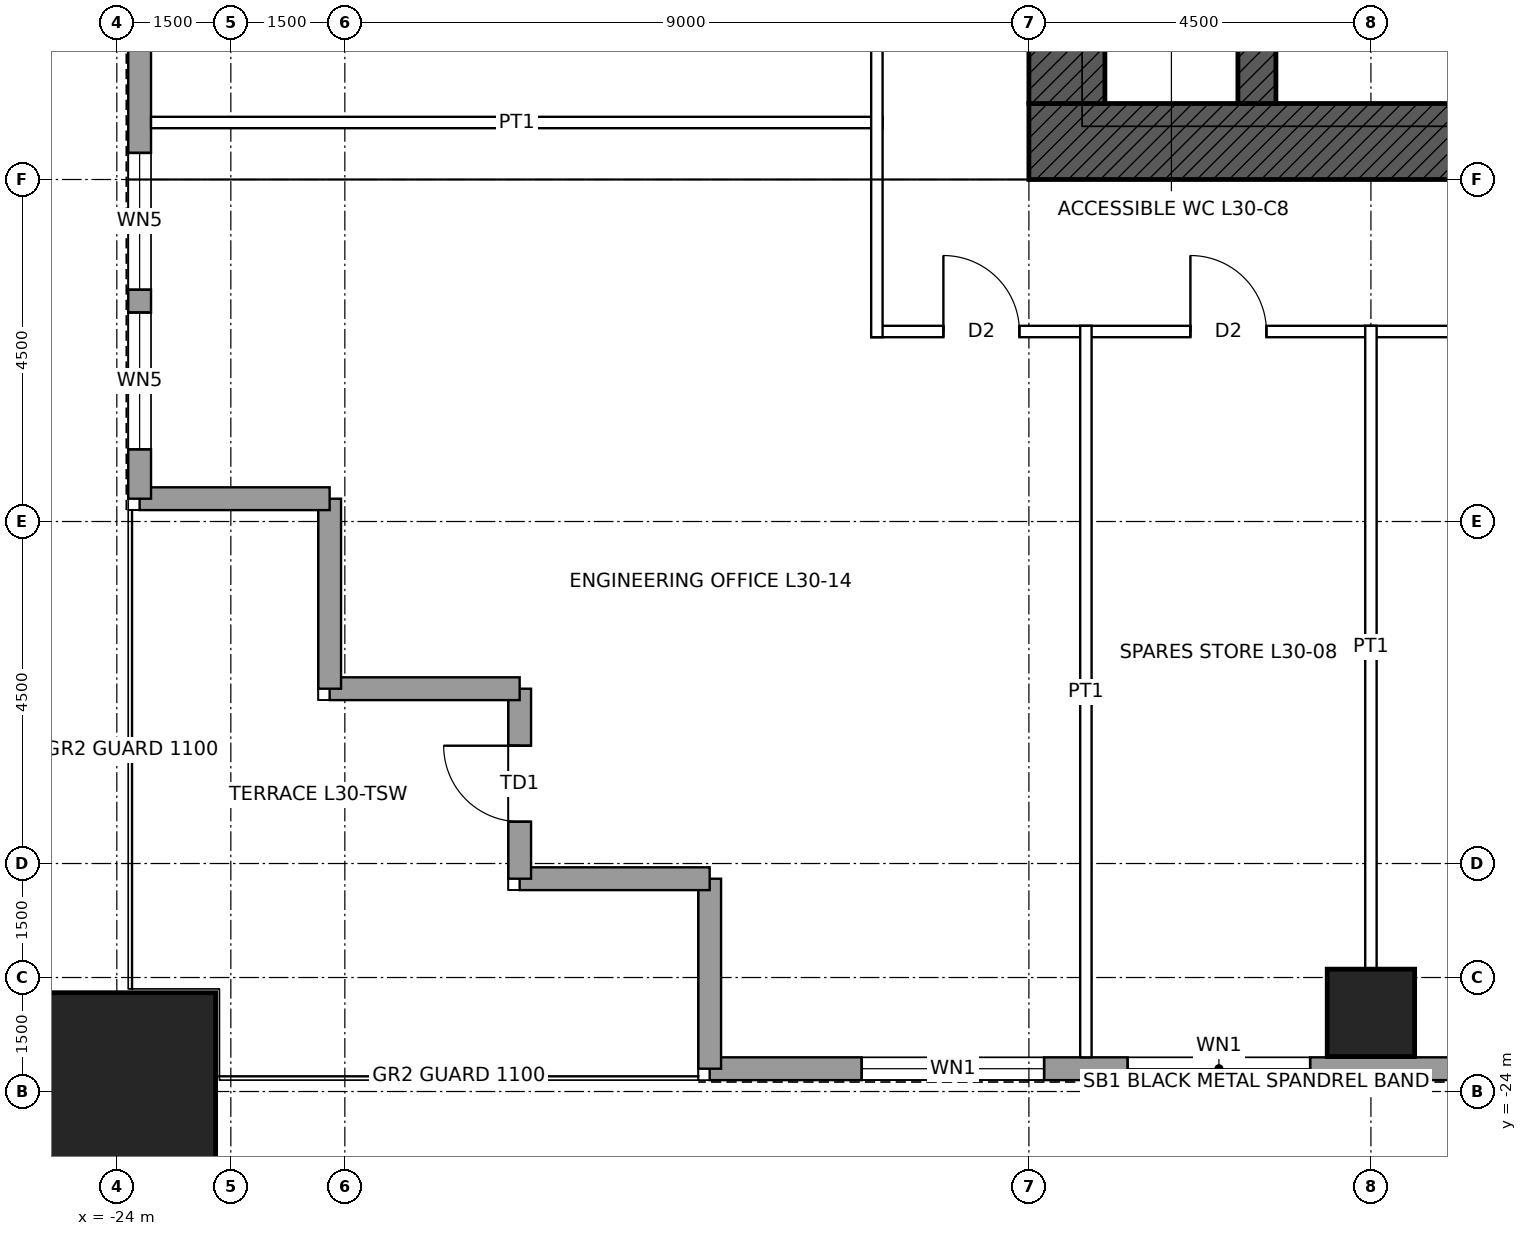
"""IFC4 building model, lengths in metres.
Left out: names, types, materials, properties, quantities, classifications, styles, units other than length and angle.
Written with IfcOpenShell. Run it as: python <this file> out.ifc"""

import sys

from ifc_helpers import new_model, si_unit, direction, frame, frame_2d, origin, origin_2d, place, context, subcontext, project, spatial, rectangle, hollow_rectangle, extrude, element, fill, save


model = new_model("IFC4")
c1 = context("Model", 3, precision=1e-05, world=origin(), true_north=direction((0.0, 1.0)))
c2 = subcontext(c1, "Body", "Model", "MODEL_VIEW")
j1 = project(units=[si_unit("LENGTHUNIT", "METRE"), si_unit("PLANEANGLEUNIT", "RADIAN")], contexts=[c1])
p1 = place(None, origin())
s1 = spatial("IfcSite", under=j1, at=p1, CompositionType="ELEMENT")
p2 = place(p1, origin())
s2 = spatial("IfcBuilding", under=s1, at=p2, CompositionType="ELEMENT")
p3 = place(p2, frame((0.0, 0.0, 149.4)))
s3 = spatial("IfcBuildingStorey", under=s2, at=p3, CompositionType="ELEMENT", Elevation=149.4)
p4 = place(p3, frame((-24.0, -24.0, 0.0), z_axis=(0.0, 0.0, 1.0), x_axis=(1.0, 0.0, 0.0)))
e1 = element("IfcColumn", 1, at=p4, inside=s3, PredefinedType="COLUMN", context=c2, shape_type="SweptSolid", body=[
    extrude(hollow_rectangle(XDim=2.6, YDim=2.6, WallThickness=0.13, at=origin_2d()), origin(), (0.0, 0.0, 1.0), 4.5),
])
p5 = place(p3, frame((-7.5, -22.965, 0.0), z_axis=(0.0, 0.0, 1.0), x_axis=(1.0, 0.0, 0.0)))
e2 = element("IfcColumn", 2, at=p5, inside=s3, PredefinedType="COLUMN", context=c2, shape_type="SweptSolid", body=[
    extrude(hollow_rectangle(XDim=1.15, YDim=1.15, WallThickness=0.075, at=origin_2d()), origin(), (0.0, 0.0, 1.0), 4.5),
])
p6 = place(p3, frame((12.0, -11.5, 0.0), z_axis=(0.0, 0.0, 1.0), x_axis=(-1.0, 0.0, 0.0)))
e3 = element("IfcWall", 3, at=p6, inside=s3, PredefinedType="SHEAR", context=c2, shape_type="SweptSolid", body=[
    extrude(rectangle(XDim=24.0, YDim=1.0, at=frame_2d((12.0, 0.0))), origin(), (0.0, 0.0, 1.0), 4.5),
])
p7 = place(p6, frame((11.5, 0.0, 0.0)))
e4 = element("IfcOpeningElement", 4, at=p7, cuts=e3, PredefinedType="OPENING", context=c2, shape_type="SweptSolid", body=[
    extrude(rectangle(XDim=1.0, YDim=2.1, at=frame_2d((0.5, 1.05))), frame((0.0, 0.51, 0.0), z_axis=(0.0, -1.0, 0.0), x_axis=(1.0, 0.0, 0.0)), (0.0, 0.0, 1.0), 1.02),
])
p8 = place(p6, frame((1.0, 0.0, 0.0)))
e5 = element("IfcOpeningElement", 5, at=p8, cuts=e3, PredefinedType="OPENING", context=c2, shape_type="SweptSolid", body=[
    extrude(rectangle(XDim=1.0, YDim=2.4, at=frame_2d((0.5, 1.2))), frame((0.0, 0.51, 0.0), z_axis=(0.0, -1.0, 0.0), x_axis=(1.0, 0.0, 0.0)), (0.0, 0.0, 1.0), 1.02),
])
p9 = place(p3, frame((-11.5, -11.0, 0.0), z_axis=(0.0, 0.0, 1.0), x_axis=(0.0, 1.0, 0.0)))
e6 = element("IfcWall", 6, at=p9, inside=s3, PredefinedType="SHEAR", context=c2, shape_type="SweptSolid", body=[
    extrude(rectangle(XDim=22.0, YDim=1.0, at=frame_2d((11.0, 0.0))), origin(), (0.0, 0.0, 1.0), 4.5),
])
p10 = place(p9, frame((10.5, 0.0, 0.0)))
e7 = element("IfcOpeningElement", 7, at=p10, cuts=e6, PredefinedType="OPENING", context=c2, shape_type="SweptSolid", body=[
    extrude(rectangle(XDim=1.0, YDim=2.4, at=frame_2d((0.5, 1.2))), frame((0.0, 0.51, 0.0), z_axis=(0.0, -1.0, 0.0), x_axis=(1.0, 0.0, 0.0)), (0.0, 0.0, 1.0), 1.02),
])
p11 = place(p3, frame((-9.0, -11.0, 0.0), z_axis=(0.0, 0.0, 1.0), x_axis=(0.0, 1.0, 0.0)))
e8 = element("IfcWall", 8, at=p11, inside=s3, PredefinedType="SHEAR", context=c2, shape_type="SweptSolid", body=[
    extrude(rectangle(XDim=6.5, YDim=0.5, at=frame_2d((3.25, 0.0))), origin(), (0.0, 0.0, 1.0), 4.5),
])
p12 = place(p11, frame((4.25, 0.0, 0.0)))
e9 = element("IfcOpeningElement", 9, at=p12, cuts=e8, PredefinedType="OPENING", context=c2, shape_type="SweptSolid", body=[
    extrude(rectangle(XDim=1.0, YDim=2.1, at=frame_2d((0.5, 1.05))), frame((0.0, 0.26, 0.0), z_axis=(0.0, -1.0, 0.0), x_axis=(1.0, 0.0, 0.0)), (0.0, 0.0, 1.0), 0.52),
])
p13 = place(p3, frame((16.2, -23.7, 0.0), z_axis=(0.0, 0.0, 1.0), x_axis=(-1.0, 0.0, 0.0)))
e10 = element("IfcWall", 10, at=p13, inside=s3, PredefinedType="SOLIDWALL", context=c2, shape_type="SweptSolid", body=[
    extrude(rectangle(XDim=32.4, YDim=0.3, at=frame_2d((16.2, 0.0))), origin(), (0.0, 0.0, 1.0), 4.3),
])
p14 = place(p13, frame((2.0, 0.0, 1.0)))
e11 = element("IfcOpeningElement", 11, at=p14, cuts=e10, PredefinedType="OPENING", context=c2, shape_type="SweptSolid", body=[
    extrude(rectangle(XDim=2.4, YDim=1.2, at=frame_2d((1.2, 0.6))), frame((0.0, 0.16, 0.0), z_axis=(0.0, -1.0, 0.0), x_axis=(1.0, 0.0, 0.0)), (0.0, 0.0, 1.0), 0.32),
])
p15 = place(p13, frame((5.5, 0.0, 1.0)))
e12 = element("IfcOpeningElement", 12, at=p15, cuts=e10, PredefinedType="OPENING", context=c2, shape_type="SweptSolid", body=[
    extrude(rectangle(XDim=2.4, YDim=1.2, at=frame_2d((1.2, 0.6))), frame((0.0, 0.16, 0.0), z_axis=(0.0, -1.0, 0.0), x_axis=(1.0, 0.0, 0.0)), (0.0, 0.0, 1.0), 0.32),
])
p16 = place(p13, frame((11.8, 0.0, 1.0)))
e13 = element("IfcOpeningElement", 13, at=p16, cuts=e10, PredefinedType="OPENING", context=c2, shape_type="SweptSolid", body=[
    extrude(rectangle(XDim=1.8, YDim=1.2, at=frame_2d((0.9, 0.6))), frame((0.0, 0.16, 0.0), z_axis=(0.0, -1.0, 0.0), x_axis=(1.0, 0.0, 0.0)), (0.0, 0.0, 1.0), 0.32),
])
p17 = place(p13, frame((13.9, 0.0, 1.0)))
e14 = element("IfcOpeningElement", 14, at=p17, cuts=e10, PredefinedType="OPENING", context=c2, shape_type="SweptSolid", body=[
    extrude(rectangle(XDim=1.8, YDim=1.2, at=frame_2d((0.9, 0.6))), frame((0.0, 0.16, 0.0), z_axis=(0.0, -1.0, 0.0), x_axis=(1.0, 0.0, 0.0)), (0.0, 0.0, 1.0), 0.32),
])
p18 = place(p13, frame((16.1, 0.0, 1.0)))
e15 = element("IfcOpeningElement", 15, at=p18, cuts=e10, PredefinedType="OPENING", context=c2, shape_type="SweptSolid", body=[
    extrude(rectangle(XDim=2.4, YDim=1.2, at=frame_2d((1.2, 0.6))), frame((0.0, 0.16, 0.0), z_axis=(0.0, -1.0, 0.0), x_axis=(1.0, 0.0, 0.0)), (0.0, 0.0, 1.0), 0.32),
])
p19 = place(p13, frame((18.8, 0.0, 1.0)))
e16 = element("IfcOpeningElement", 16, at=p19, cuts=e10, PredefinedType="OPENING", context=c2, shape_type="SweptSolid", body=[
    extrude(rectangle(XDim=1.8, YDim=1.2, at=frame_2d((0.9, 0.6))), frame((0.0, 0.16, 0.0), z_axis=(0.0, -1.0, 0.0), x_axis=(1.0, 0.0, 0.0)), (0.0, 0.0, 1.0), 0.32),
])
p20 = place(p13, frame((24.5, 0.0, 1.0)))
e17 = element("IfcOpeningElement", 17, at=p20, cuts=e10, PredefinedType="OPENING", context=c2, shape_type="SweptSolid", body=[
    extrude(rectangle(XDim=2.4, YDim=1.2, at=frame_2d((1.2, 0.6))), frame((0.0, 0.16, 0.0), z_axis=(0.0, -1.0, 0.0), x_axis=(1.0, 0.0, 0.0)), (0.0, 0.0, 1.0), 0.32),
])
p21 = place(p13, frame((28.0, 0.0, 1.0)))
e18 = element("IfcOpeningElement", 18, at=p21, cuts=e10, PredefinedType="OPENING", context=c2, shape_type="SweptSolid", body=[
    extrude(rectangle(XDim=2.4, YDim=1.2, at=frame_2d((1.2, 0.6))), frame((0.0, 0.16, 0.0), z_axis=(0.0, -1.0, 0.0), x_axis=(1.0, 0.0, 0.0)), (0.0, 0.0, 1.0), 0.32),
])
for number, where, z_axis, x_axis in (
    (19, (-16.2, -23.7, 0.0), (0.0, 0.0, 1.0), (0.0, 1.0, 0.0)),
    (20, (-16.2, -21.2, 0.0), (0.0, 0.0, 1.0), (-1.0, 0.0, 0.0)),
):
    element("IfcWall", number, at=place(p3, frame(where, z_axis=z_axis, x_axis=x_axis)), inside=s3, PredefinedType="SOLIDWALL", context=c2, shape_type="SweptSolid", body=[
        extrude(rectangle(XDim=2.5, YDim=0.3, at=frame_2d((1.25, 0.0))), origin(), (0.0, 0.0, 1.0), 4.3),
    ])
p22 = place(p3, frame((-18.7, -21.2, 0.0), z_axis=(0.0, 0.0, 1.0), x_axis=(0.0, 1.0, 0.0)))
e21 = element("IfcWall", 21, at=p22, inside=s3, PredefinedType="SOLIDWALL", context=c2, shape_type="SweptSolid", body=[
    extrude(rectangle(XDim=2.5, YDim=0.3, at=frame_2d((1.25, 0.0))), origin(), (0.0, 0.0, 1.0), 4.3),
])
p23 = place(p22, frame((0.75, 0.0, 0.0)))
e22 = element("IfcOpeningElement", 22, at=p23, cuts=e21, PredefinedType="OPENING", context=c2, shape_type="SweptSolid", body=[
    extrude(rectangle(XDim=1.0, YDim=2.4, at=frame_2d((0.5, 1.2))), frame((0.0, 0.16, 0.0), z_axis=(0.0, -1.0, 0.0), x_axis=(1.0, 0.0, 0.0)), (0.0, 0.0, 1.0), 0.32),
])
for number, where, z_axis, x_axis in (
    (23, (-18.7, -18.7, 0.0), (0.0, 0.0, 1.0), (-1.0, 0.0, 0.0)),
    (24, (-21.2, -18.7, 0.0), (0.0, 0.0, 1.0), (0.0, 1.0, 0.0)),
    (25, (-21.2, -16.2, 0.0), (0.0, 0.0, 1.0), (-1.0, 0.0, 0.0)),
):
    element("IfcWall", number, at=place(p3, frame(where, z_axis=z_axis, x_axis=x_axis)), inside=s3, PredefinedType="SOLIDWALL", context=c2, shape_type="SweptSolid", body=[
        extrude(rectangle(XDim=2.5, YDim=0.3, at=frame_2d((1.25, 0.0))), origin(), (0.0, 0.0, 1.0), 4.3),
    ])
p24 = place(p3, frame((-23.7, -16.2, 0.0), z_axis=(0.0, 0.0, 1.0), x_axis=(0.0, 1.0, 0.0)))
e26 = element("IfcWall", 26, at=p24, inside=s3, PredefinedType="SOLIDWALL", context=c2, shape_type="SweptSolid", body=[
    extrude(rectangle(XDim=32.4, YDim=0.3, at=frame_2d((16.2, 0.0))), origin(), (0.0, 0.0, 1.0), 4.3),
])
p25 = place(p24, frame((0.65, 0.0, 1.0)))
e27 = element("IfcOpeningElement", 27, at=p25, cuts=e26, PredefinedType="OPENING", context=c2, shape_type="SweptSolid", body=[
    extrude(rectangle(XDim=1.8, YDim=1.2, at=frame_2d((0.9, 0.6))), frame((0.0, 0.16, 0.0), z_axis=(0.0, -1.0, 0.0), x_axis=(1.0, 0.0, 0.0)), (0.0, 0.0, 1.0), 0.32),
])
p26 = place(p24, frame((2.75, 0.0, 1.0)))
e28 = element("IfcOpeningElement", 28, at=p26, cuts=e26, PredefinedType="OPENING", context=c2, shape_type="SweptSolid", body=[
    extrude(rectangle(XDim=1.8, YDim=1.2, at=frame_2d((0.9, 0.6))), frame((0.0, 0.16, 0.0), z_axis=(0.0, -1.0, 0.0), x_axis=(1.0, 0.0, 0.0)), (0.0, 0.0, 1.0), 0.32),
])
p27 = place(p24, frame((6.75, 0.0, 1.0)))
e29 = element("IfcOpeningElement", 29, at=p27, cuts=e26, PredefinedType="OPENING", context=c2, shape_type="SweptSolid", body=[
    extrude(rectangle(XDim=2.4, YDim=1.2, at=frame_2d((1.2, 0.6))), frame((0.0, 0.16, 0.0), z_axis=(0.0, -1.0, 0.0), x_axis=(1.0, 0.0, 0.0)), (0.0, 0.0, 1.0), 0.32),
])
p28 = place(p24, frame((12.95, 0.0, 1.0)))
e30 = element("IfcOpeningElement", 30, at=p28, cuts=e26, PredefinedType="OPENING", context=c2, shape_type="SweptSolid", body=[
    extrude(rectangle(XDim=2.4, YDim=1.2, at=frame_2d((1.2, 0.6))), frame((0.0, 0.16, 0.0), z_axis=(0.0, -1.0, 0.0), x_axis=(1.0, 0.0, 0.0)), (0.0, 0.0, 1.0), 0.32),
])
p29 = place(p24, frame((15.65, 0.0, 1.0)))
e31 = element("IfcOpeningElement", 31, at=p29, cuts=e26, PredefinedType="OPENING", context=c2, shape_type="SweptSolid", body=[
    extrude(rectangle(XDim=1.8, YDim=1.2, at=frame_2d((0.9, 0.6))), frame((0.0, 0.16, 0.0), z_axis=(0.0, -1.0, 0.0), x_axis=(1.0, 0.0, 0.0)), (0.0, 0.0, 1.0), 0.32),
])
p30 = place(p24, frame((17.75, 0.0, 1.0)))
e32 = element("IfcOpeningElement", 32, at=p30, cuts=e26, PredefinedType="OPENING", context=c2, shape_type="SweptSolid", body=[
    extrude(rectangle(XDim=1.8, YDim=1.2, at=frame_2d((0.9, 0.6))), frame((0.0, 0.16, 0.0), z_axis=(0.0, -1.0, 0.0), x_axis=(1.0, 0.0, 0.0)), (0.0, 0.0, 1.0), 0.32),
])
p31 = place(p24, frame((24.5, 0.0, 1.0)))
e33 = element("IfcOpeningElement", 33, at=p31, cuts=e26, PredefinedType="OPENING", context=c2, shape_type="SweptSolid", body=[
    extrude(rectangle(XDim=2.4, YDim=1.2, at=frame_2d((1.2, 0.6))), frame((0.0, 0.16, 0.0), z_axis=(0.0, -1.0, 0.0), x_axis=(1.0, 0.0, 0.0)), (0.0, 0.0, 1.0), 0.32),
])
p32 = place(p24, frame((28.0, 0.0, 1.0)))
e34 = element("IfcOpeningElement", 34, at=p32, cuts=e26, PredefinedType="OPENING", context=c2, shape_type="SweptSolid", body=[
    extrude(rectangle(XDim=2.4, YDim=1.2, at=frame_2d((1.2, 0.6))), frame((0.0, 0.16, 0.0), z_axis=(0.0, -1.0, 0.0), x_axis=(1.0, 0.0, 0.0)), (0.0, 0.0, 1.0), 0.32),
])
p33 = place(p3, frame((-14.075, -14.0, 0.0), z_axis=(0.0, 0.0, 1.0), x_axis=(1.0, 0.0, 0.0)))
e35 = element("IfcWall", 35, at=p33, inside=s3, PredefinedType="PARTITIONING", context=c2, shape_type="SweptSolid", body=[
    extrude(rectangle(XDim=28.15, YDim=0.15, at=frame_2d((14.075, 0.0))), origin(), (0.0, 0.0, 1.0), 4.3),
])
p34 = place(p33, frame((18.8, 0.0, 0.0)))
e36 = element("IfcOpeningElement", 36, at=p34, cuts=e35, PredefinedType="OPENING", context=c2, shape_type="SweptSolid", body=[
    extrude(rectangle(XDim=1.8, YDim=2.4, at=frame_2d((0.9, 1.2))), frame((0.0, 0.085, 0.0), z_axis=(0.0, -1.0, 0.0), x_axis=(1.0, 0.0, 0.0)), (0.0, 0.0, 1.0), 0.17),
])
p35 = place(p33, frame((9.425, 0.0, 0.0)))
e37 = element("IfcOpeningElement", 37, at=p35, cuts=e35, PredefinedType="OPENING", context=c2, shape_type="SweptSolid", body=[
    extrude(rectangle(XDim=1.8, YDim=2.4, at=frame_2d((0.9, 1.2))), frame((0.0, 0.085, 0.0), z_axis=(0.0, -1.0, 0.0), x_axis=(1.0, 0.0, 0.0)), (0.0, 0.0, 1.0), 0.17),
])
p36 = place(p33, frame((4.2, 0.0, 0.0)))
e38 = element("IfcOpeningElement", 38, at=p36, cuts=e35, PredefinedType="OPENING", context=c2, shape_type="SweptSolid", body=[
    extrude(rectangle(XDim=1.0, YDim=2.1, at=frame_2d((0.5, 1.05))), frame((0.0, 0.085, 0.0), z_axis=(0.0, -1.0, 0.0), x_axis=(1.0, 0.0, 0.0)), (0.0, 0.0, 1.0), 0.17),
])
p37 = place(p33, frame((26.2, 0.0, 0.0)))
e39 = element("IfcOpeningElement", 39, at=p37, cuts=e35, PredefinedType="OPENING", context=c2, shape_type="SweptSolid", body=[
    extrude(rectangle(XDim=1.0, YDim=2.1, at=frame_2d((0.5, 1.05))), frame((0.0, 0.085, 0.0), z_axis=(0.0, -1.0, 0.0), x_axis=(1.0, 0.0, 0.0)), (0.0, 0.0, 1.0), 0.17),
])
p38 = place(p33, frame((0.95, 0.0, 0.0)))
e40 = element("IfcOpeningElement", 40, at=p38, cuts=e35, PredefinedType="OPENING", context=c2, shape_type="SweptSolid", body=[
    extrude(rectangle(XDim=1.0, YDim=2.1, at=frame_2d((0.5, 1.05))), frame((0.0, 0.085, 0.0), z_axis=(0.0, -1.0, 0.0), x_axis=(1.0, 0.0, 0.0)), (0.0, 0.0, 1.0), 0.17),
])
p39 = place(p3, frame((-23.55, -11.25, 0.0), z_axis=(0.0, 0.0, 1.0), x_axis=(1.0, 0.0, 0.0)))
e41 = element("IfcWall", 41, at=p39, inside=s3, PredefinedType="PARTITIONING", context=c2, shape_type="SweptSolid", body=[
    extrude(rectangle(XDim=9.625, YDim=0.15, at=frame_2d((4.812, 0.0))), origin(), (0.0, 0.0, 1.0), 3.431),
])
p40 = place(p3, frame((-14.0, -14.075, 0.0), z_axis=(0.0, 0.0, 1.0), x_axis=(0.0, 1.0, 0.0)))
e42 = element("IfcWall", 42, at=p40, inside=s3, PredefinedType="PARTITIONING", context=c2, shape_type="SweptSolid", body=[
    extrude(rectangle(XDim=26.15, YDim=0.15, at=frame_2d((13.075, 0.0))), origin(), (0.0, 0.0, 1.0), 4.3),
])
p41 = place(p40, frame((5.675, 0.0, 0.0)))
e43 = element("IfcOpeningElement", 43, at=p41, cuts=e42, PredefinedType="OPENING", context=c2, shape_type="SweptSolid", body=[
    extrude(rectangle(XDim=1.8, YDim=2.4, at=frame_2d((0.9, 1.2))), frame((0.0, 0.085, 0.0), z_axis=(0.0, -1.0, 0.0), x_axis=(1.0, 0.0, 0.0)), (0.0, 0.0, 1.0), 0.17),
])
p42 = place(p40, frame((13.175, 0.0, 0.0)))
e44 = element("IfcOpeningElement", 44, at=p42, cuts=e42, PredefinedType="OPENING", context=c2, shape_type="SweptSolid", body=[
    extrude(rectangle(XDim=1.8, YDim=2.4, at=frame_2d((0.9, 1.2))), frame((0.0, 0.085, 0.0), z_axis=(0.0, -1.0, 0.0), x_axis=(1.0, 0.0, 0.0)), (0.0, 0.0, 1.0), 0.17),
])
p43 = place(p40, frame((20.675, 0.0, 0.0)))
e45 = element("IfcOpeningElement", 45, at=p43, cuts=e42, PredefinedType="OPENING", context=c2, shape_type="SweptSolid", body=[
    extrude(rectangle(XDim=1.8, YDim=2.4, at=frame_2d((0.9, 1.2))), frame((0.0, 0.085, 0.0), z_axis=(0.0, -1.0, 0.0), x_axis=(1.0, 0.0, 0.0)), (0.0, 0.0, 1.0), 0.17),
])
p44 = place(p3, frame((-11.25, -23.55, 0.0), z_axis=(0.0, 0.0, 1.0), x_axis=(0.0, 1.0, 0.0)))
e46 = element("IfcWall", 46, at=p44, inside=s3, PredefinedType="PARTITIONING", context=c2, shape_type="SweptSolid", body=[
    extrude(rectangle(XDim=9.625, YDim=0.15, at=frame_2d((4.812, 0.0))), origin(), (0.0, 0.0, 1.0), 3.431),
])
p45 = place(p3, frame((-7.5, -22.39, 0.0), z_axis=(0.0, 0.0, 1.0), x_axis=(0.0, 1.0, 0.0)))
e47 = element("IfcWall", 47, at=p45, inside=s3, PredefinedType="PARTITIONING", context=c2, shape_type="SweptSolid", body=[
    extrude(rectangle(XDim=8.465, YDim=0.15, at=frame_2d((4.232, 0.0))), origin(), (0.0, 0.0, 1.0), 3.431),
])
p46 = place(p20, origin())
e48 = element("IfcWindow", 48, at=p46, inside=s3, PartitioningType="SINGLE_PANEL", PredefinedType="WINDOW", context=c2, shape_type="SweptSolid", body=[
    extrude(rectangle(XDim=2.4, YDim=1.2, at=frame_2d((1.2, 0.6))), frame((0.0, 0.03, 0.0), z_axis=(0.0, -1.0, 0.0), x_axis=(1.0, 0.0, 0.0)), (0.0, 0.0, 1.0), 0.06),
])
fill(e17, e48)
p47 = place(p21, origin())
e49 = element("IfcWindow", 49, at=p47, inside=s3, PartitioningType="SINGLE_PANEL", PredefinedType="WINDOW", context=c2, shape_type="SweptSolid", body=[
    extrude(rectangle(XDim=2.4, YDim=1.2, at=frame_2d((1.2, 0.6))), frame((0.0, 0.03, 0.0), z_axis=(0.0, -1.0, 0.0), x_axis=(1.0, 0.0, 0.0)), (0.0, 0.0, 1.0), 0.06),
])
fill(e18, e49)
p48 = place(p23, origin())
e50 = element("IfcDoor", 50, at=p48, inside=s3, OperationType="SINGLE_SWING_RIGHT", PredefinedType="DOOR", context=c2, shape_type="SweptSolid", body=[
    extrude(rectangle(XDim=1.0, YDim=2.4, at=frame_2d((0.5, 1.2))), frame((0.0, 0.025, 0.0), z_axis=(0.0, -1.0, 0.0), x_axis=(1.0, 0.0, 0.0)), (0.0, 0.0, 1.0), 0.05),
])
fill(e22, e50)
p49 = place(p25, origin())
e51 = element("IfcWindow", 51, at=p49, inside=s3, PartitioningType="SINGLE_PANEL", PredefinedType="WINDOW", context=c2, shape_type="SweptSolid", body=[
    extrude(rectangle(XDim=1.8, YDim=1.2, at=frame_2d((0.9, 0.6))), frame((0.0, 0.03, 0.0), z_axis=(0.0, -1.0, 0.0), x_axis=(1.0, 0.0, 0.0)), (0.0, 0.0, 1.0), 0.06),
])
fill(e27, e51)
p50 = place(p26, origin())
e52 = element("IfcWindow", 52, at=p50, inside=s3, PartitioningType="SINGLE_PANEL", PredefinedType="WINDOW", context=c2, shape_type="SweptSolid", body=[
    extrude(rectangle(XDim=1.8, YDim=1.2, at=frame_2d((0.9, 0.6))), frame((0.0, 0.03, 0.0), z_axis=(0.0, -1.0, 0.0), x_axis=(1.0, 0.0, 0.0)), (0.0, 0.0, 1.0), 0.06),
])
fill(e28, e52)
p51 = place(p36, origin())
e53 = element("IfcDoor", 53, at=p51, inside=s3, OperationType="SINGLE_SWING_LEFT", PredefinedType="DOOR", context=c2, shape_type="SweptSolid", body=[
    extrude(rectangle(XDim=1.0, YDim=2.1, at=frame_2d((0.5, 1.05))), frame((0.0, 0.025, 0.0), z_axis=(0.0, -1.0, 0.0), x_axis=(1.0, 0.0, 0.0)), (0.0, 0.0, 1.0), 0.05),
])
fill(e38, e53)
p52 = place(p38, origin())
e54 = element("IfcDoor", 54, at=p52, inside=s3, OperationType="SINGLE_SWING_LEFT", PredefinedType="DOOR", context=c2, shape_type="SweptSolid", body=[
    extrude(rectangle(XDim=1.0, YDim=2.1, at=frame_2d((0.5, 1.05))), frame((0.0, 0.025, 0.0), z_axis=(0.0, -1.0, 0.0), x_axis=(1.0, 0.0, 0.0)), (0.0, 0.0, 1.0), 0.05),
])
fill(e40, e54)
save(model, sys.argv[1])
